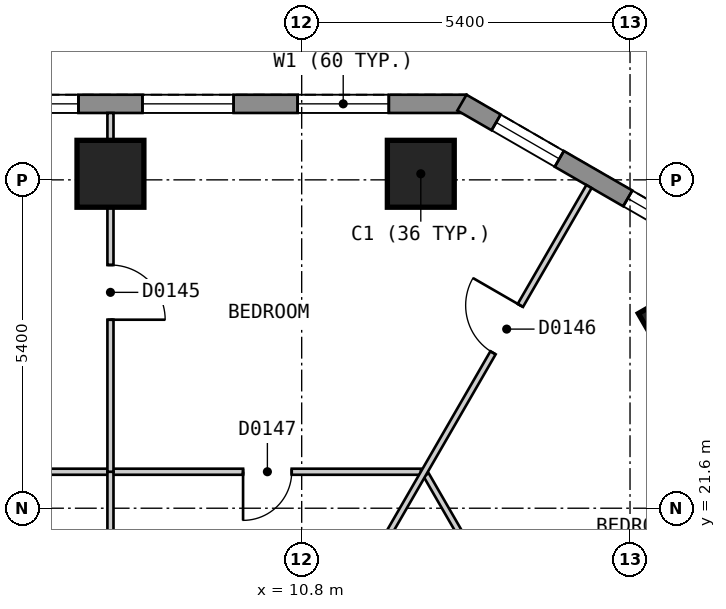
"""IFC4 building model, lengths in metres.
Left out: names, types, materials, properties, quantities, classifications, styles, units other than length and angle.
Written with IfcOpenShell. Run it as: python <this file> out.ifc"""

import sys

from ifc_helpers import new_model, si_unit, direction, frame, frame_2d, origin, origin_2d, place, context, subcontext, project, spatial, polyline, rectangle, outline, extrude, element, fill, save


model = new_model("IFC4")
c1 = context("Model", 3, precision=1e-05, world=origin(), true_north=direction((0.0, 1.0)))
c2 = subcontext(c1, "Body", "Model", "MODEL_VIEW")
j1 = project(units=[si_unit("LENGTHUNIT", "METRE"), si_unit("PLANEANGLEUNIT", "RADIAN")], contexts=[c1])
p1 = place(None, origin())
s1 = spatial("IfcSite", under=j1, at=p1, CompositionType="ELEMENT")
p2 = place(p1, origin())
s2 = spatial("IfcBuilding", under=s1, at=p2, CompositionType="ELEMENT")
p3 = place(p2, frame((0.0, 0.0, 23.4)))
s3 = spatial("IfcBuildingStorey", under=s2, at=p3, CompositionType="ELEMENT", Elevation=23.4)
for number, where, z_axis, x_axis in (
    (1, (12.759, 27.1, 0.0), (0.0, 0.0, 1.0), (-1.0, 0.0, 0.0)),
    (2, (7.655, 27.1, 0.0), (0.0, 0.0, 1.0), (-1.0, 0.0, 0.0)),
    (3, (17.089, 24.601, 0.0), (0.0, 0.0, 1.0), (-0.5, 0.866, 0.0)),
):
    element("IfcColumn", number, at=place(p3, frame(where, z_axis=z_axis, x_axis=x_axis)), inside=s3, PredefinedType="COLUMN", context=c2, shape_type="SweptSolid", body=[
        extrude(rectangle(XDim=1.1, YDim=1.1, at=origin_2d()), origin(), (0.0, 0.0, 1.0), 3.0),
    ])
p4 = place(p3, frame((13.51, 28.25, 0.0), z_axis=(0.0, 0.0, 1.0), x_axis=(-1.0, 0.0, 0.0)))
e4 = element("IfcWall", 4, at=p4, inside=s3, PredefinedType="SOLIDWALL", context=c2, shape_type="SweptSolid", body=[
    extrude(outline(polyline([(0.0, -0.15), (27.02, -0.15), (26.94, 0.15), (0.08, 0.15), (0.0, -0.15)])), origin(), (0.0, 0.0, 1.0), 2.7),
])
p5 = place(p4, frame((1.277, 0.0, 0.15)))
e5 = element("IfcOpeningElement", 5, at=p5, cuts=e4, PredefinedType="OPENING", context=c2, shape_type="SweptSolid", body=[
    extrude(rectangle(XDim=1.5, YDim=2.1, at=frame_2d((0.75, 1.05))), frame((0.0, 0.16, 0.0), z_axis=(0.0, -1.0, 0.0), x_axis=(1.0, 0.0, 0.0)), (0.0, 0.0, 1.0), 0.32),
])
p6 = place(p4, frame((3.829, 0.0, 0.15)))
e6 = element("IfcOpeningElement", 6, at=p6, cuts=e4, PredefinedType="OPENING", context=c2, shape_type="SweptSolid", body=[
    extrude(rectangle(XDim=1.5, YDim=2.1, at=frame_2d((0.75, 1.05))), frame((0.0, 0.16, 0.0), z_axis=(0.0, -1.0, 0.0), x_axis=(1.0, 0.0, 0.0)), (0.0, 0.0, 1.0), 0.32),
])
p7 = place(p4, frame((6.381, 0.0, 0.15)))
e7 = element("IfcOpeningElement", 7, at=p7, cuts=e4, PredefinedType="OPENING", context=c2, shape_type="SweptSolid", body=[
    extrude(rectangle(XDim=1.5, YDim=2.1, at=frame_2d((0.75, 1.05))), frame((0.0, 0.16, 0.0), z_axis=(0.0, -1.0, 0.0), x_axis=(1.0, 0.0, 0.0)), (0.0, 0.0, 1.0), 0.32),
])
p8 = place(p4, frame((8.933, 0.0, 0.15)))
e8 = element("IfcOpeningElement", 8, at=p8, cuts=e4, PredefinedType="OPENING", context=c2, shape_type="SweptSolid", body=[
    extrude(rectangle(XDim=1.5, YDim=2.1, at=frame_2d((0.75, 1.05))), frame((0.0, 0.16, 0.0), z_axis=(0.0, -1.0, 0.0), x_axis=(1.0, 0.0, 0.0)), (0.0, 0.0, 1.0), 0.32),
])
p9 = place(p4, frame((11.485, 0.0, 0.15)))
e9 = element("IfcOpeningElement", 9, at=p9, cuts=e4, PredefinedType="OPENING", context=c2, shape_type="SweptSolid", body=[
    extrude(rectangle(XDim=1.5, YDim=2.1, at=frame_2d((0.75, 1.05))), frame((0.0, 0.16, 0.0), z_axis=(0.0, -1.0, 0.0), x_axis=(1.0, 0.0, 0.0)), (0.0, 0.0, 1.0), 0.32),
])
p10 = place(p4, frame((14.037, 0.0, 0.15)))
e10 = element("IfcOpeningElement", 10, at=p10, cuts=e4, PredefinedType="OPENING", context=c2, shape_type="SweptSolid", body=[
    extrude(rectangle(XDim=1.5, YDim=2.1, at=frame_2d((0.75, 1.05))), frame((0.0, 0.16, 0.0), z_axis=(0.0, -1.0, 0.0), x_axis=(1.0, 0.0, 0.0)), (0.0, 0.0, 1.0), 0.32),
])
p11 = place(p4, frame((16.589, 0.0, 0.15)))
e11 = element("IfcOpeningElement", 11, at=p11, cuts=e4, PredefinedType="OPENING", context=c2, shape_type="SweptSolid", body=[
    extrude(rectangle(XDim=1.5, YDim=2.1, at=frame_2d((0.75, 1.05))), frame((0.0, 0.16, 0.0), z_axis=(0.0, -1.0, 0.0), x_axis=(1.0, 0.0, 0.0)), (0.0, 0.0, 1.0), 0.32),
])
p12 = place(p4, frame((19.141, 0.0, 0.15)))
e12 = element("IfcOpeningElement", 12, at=p12, cuts=e4, PredefinedType="OPENING", context=c2, shape_type="SweptSolid", body=[
    extrude(rectangle(XDim=1.5, YDim=2.1, at=frame_2d((0.75, 1.05))), frame((0.0, 0.16, 0.0), z_axis=(0.0, -1.0, 0.0), x_axis=(1.0, 0.0, 0.0)), (0.0, 0.0, 1.0), 0.32),
])
p13 = place(p4, frame((21.693, 0.0, 0.15)))
e13 = element("IfcOpeningElement", 13, at=p13, cuts=e4, PredefinedType="OPENING", context=c2, shape_type="SweptSolid", body=[
    extrude(rectangle(XDim=1.5, YDim=2.1, at=frame_2d((0.75, 1.05))), frame((0.0, 0.16, 0.0), z_axis=(0.0, -1.0, 0.0), x_axis=(1.0, 0.0, 0.0)), (0.0, 0.0, 1.0), 0.32),
])
p14 = place(p4, frame((24.245, 0.0, 0.15)))
e14 = element("IfcOpeningElement", 14, at=p14, cuts=e4, PredefinedType="OPENING", context=c2, shape_type="SweptSolid", body=[
    extrude(rectangle(XDim=1.5, YDim=2.1, at=frame_2d((0.75, 1.05))), frame((0.0, 0.16, 0.0), z_axis=(0.0, -1.0, 0.0), x_axis=(1.0, 0.0, 0.0)), (0.0, 0.0, 1.0), 0.32),
])
p15 = place(p3, frame((17.765, 25.77, 0.0), z_axis=(0.0, 0.0, 1.0), x_axis=(-0.866010750942, 0.50002537861, 0.0)))
e15 = element("IfcWall", 15, at=p15, inside=s3, PredefinedType="SOLIDWALL", context=c2, shape_type="SweptSolid", body=[
    extrude(outline(polyline([(0.0, -0.15), (5.0, -0.15), (4.919, 0.15), (0.08, 0.15), (0.0, -0.15)])), origin(), (0.0, 0.0, 1.0), 2.7),
])
p16 = place(p15, frame((0.65, 0.0, 0.15)))
e16 = element("IfcOpeningElement", 16, at=p16, cuts=e15, PredefinedType="OPENING", context=c2, shape_type="SweptSolid", body=[
    extrude(rectangle(XDim=1.2, YDim=2.1, at=frame_2d((0.6, 1.05))), frame((0.0, 0.16, 0.0), z_axis=(0.0, -1.0, 0.0), x_axis=(1.0, 0.0, 0.0)), (0.0, 0.0, 1.0), 0.32),
])
p17 = place(p15, frame((3.15, 0.0, 0.15)))
e17 = element("IfcOpeningElement", 17, at=p17, cuts=e15, PredefinedType="OPENING", context=c2, shape_type="SweptSolid", body=[
    extrude(rectangle(XDim=1.2, YDim=2.1, at=frame_2d((0.6, 1.05))), frame((0.0, 0.16, 0.0), z_axis=(0.0, -1.0, 0.0), x_axis=(1.0, 0.0, 0.0)), (0.0, 0.0, 1.0), 0.32),
])
p18 = place(p3, frame((12.846, 22.15, 0.0), z_axis=(0.0, 0.0, 1.0), x_axis=(0.500002715276, -0.866023836113, 0.0)))
e18 = element("IfcWall", 18, at=p18, inside=s3, PredefinedType="PARTITIONING", context=c2, shape_type="SweptSolid", body=[
    extrude(rectangle(XDim=5.002, YDim=0.1, at=frame_2d((2.501, 0.0))), origin(), (0.0, 0.0, 1.0), 2.7),
])
p19 = place(p18, frame((2.122, 0.0, 0.0)))
e19 = element("IfcOpeningElement", 19, at=p19, cuts=e18, PredefinedType="OPENING", context=c2, shape_type="SweptSolid", body=[
    extrude(rectangle(XDim=0.8, YDim=2.1, at=frame_2d((0.4, 1.05))), frame((0.0, 0.06, 0.0), z_axis=(0.0, -1.0, 0.0), x_axis=(1.0, 0.0, 0.0)), (0.0, 0.0, 1.0), 0.12),
])
p20 = place(p3, frame((2.651, 22.2, 0.0), z_axis=(0.0, 0.0, 1.0), x_axis=(1.0, 0.0, 0.0)))
e20 = element("IfcWall", 20, at=p20, inside=s3, PredefinedType="PARTITIONING", context=c2, shape_type="SweptSolid", body=[
    extrude(rectangle(XDim=10.109, YDim=0.1, at=frame_2d((5.055, 0.0))), origin(), (0.0, 0.0, 1.0), 2.7),
])
p21 = place(p20, frame((2.002, 0.0, 0.0)))
e21 = element("IfcOpeningElement", 21, at=p21, cuts=e20, PredefinedType="OPENING", context=c2, shape_type="SweptSolid", body=[
    extrude(rectangle(XDim=0.9, YDim=2.1, at=frame_2d((0.45, 1.05))), frame((0.0, 0.06, 0.0), z_axis=(0.0, -1.0, 0.0), x_axis=(1.0, 0.0, 0.0)), (0.0, 0.0, 1.0), 0.12),
])
p22 = place(p20, frame((7.185, 0.0, 0.0)))
e22 = element("IfcOpeningElement", 22, at=p22, cuts=e20, PredefinedType="OPENING", context=c2, shape_type="SweptSolid", body=[
    extrude(rectangle(XDim=0.8, YDim=2.1, at=frame_2d((0.4, 1.05))), frame((0.0, 0.06, 0.0), z_axis=(0.0, -1.0, 0.0), x_axis=(1.0, 0.0, 0.0)), (0.0, 0.0, 1.0), 0.12),
])
p23 = place(p3, frame((10.393, 18.0, 0.0), z_axis=(0.0, 0.0, 1.0), x_axis=(0.499945497007, 0.866056868816, 0.0)))
e23 = element("IfcWall", 23, at=p23, inside=s3, PredefinedType="PARTITIONING", context=c2, shape_type="SweptSolid", body=[
    extrude(rectangle(XDim=10.265, YDim=0.1, at=frame_2d((5.132, 0.0))), origin(), (0.0, 0.0, 1.0), 2.7),
])
p24 = place(p23, frame((7.108, 0.0, 0.0)))
e24 = element("IfcOpeningElement", 24, at=p24, cuts=e23, PredefinedType="OPENING", context=c2, shape_type="SweptSolid", body=[
    extrude(rectangle(XDim=0.9, YDim=2.1, at=frame_2d((0.45, 1.05))), frame((0.0, 0.06, 0.0), z_axis=(0.0, -1.0, 0.0), x_axis=(1.0, 0.0, 0.0)), (0.0, 0.0, 1.0), 0.12),
])
p25 = place(p3, frame((7.655, 18.1, 0.0), z_axis=(0.0, 0.0, 1.0), x_axis=(0.0, 1.0, 0.0)))
e25 = element("IfcWall", 25, at=p25, inside=s3, PredefinedType="PARTITIONING", context=c2, shape_type="SweptSolid", body=[
    extrude(rectangle(XDim=4.1, YDim=0.1, at=frame_2d((2.05, 0.0))), origin(), (0.0, 0.0, 1.0), 2.7),
])
p26 = place(p3, frame((7.655, 22.2, 0.0), z_axis=(0.0, 0.0, 1.0), x_axis=(0.0, 1.0, 0.0)))
e26 = element("IfcWall", 26, at=p26, inside=s3, PredefinedType="PARTITIONING", context=c2, shape_type="SweptSolid", body=[
    extrude(rectangle(XDim=5.9, YDim=0.1, at=frame_2d((2.95, 0.0))), origin(), (0.0, 0.0, 1.0), 2.7),
])
p27 = place(p26, frame((2.5, 0.0, 0.0)))
e27 = element("IfcOpeningElement", 27, at=p27, cuts=e26, PredefinedType="OPENING", context=c2, shape_type="SweptSolid", body=[
    extrude(rectangle(XDim=0.9, YDim=2.1, at=frame_2d((0.45, 1.05))), frame((0.0, 0.06, 0.0), z_axis=(0.0, -1.0, 0.0), x_axis=(1.0, 0.0, 0.0)), (0.0, 0.0, 1.0), 0.12),
])
p28 = place(p5, origin())
e28 = element("IfcWindow", 28, at=p28, inside=s3, PartitioningType="SINGLE_PANEL", PredefinedType="WINDOW", context=c2, shape_type="SweptSolid", body=[
    extrude(rectangle(XDim=1.5, YDim=2.1, at=frame_2d((0.75, 1.05))), frame((0.0, 0.03, 0.0), z_axis=(0.0, -1.0, 0.0), x_axis=(1.0, 0.0, 0.0)), (0.0, 0.0, 1.0), 0.06),
])
fill(e5, e28)
p29 = place(p6, origin())
e29 = element("IfcWindow", 29, at=p29, inside=s3, PartitioningType="SINGLE_PANEL", PredefinedType="WINDOW", context=c2, shape_type="SweptSolid", body=[
    extrude(rectangle(XDim=1.5, YDim=2.1, at=frame_2d((0.75, 1.05))), frame((0.0, 0.03, 0.0), z_axis=(0.0, -1.0, 0.0), x_axis=(1.0, 0.0, 0.0)), (0.0, 0.0, 1.0), 0.06),
])
fill(e6, e29)
p30 = place(p7, origin())
e30 = element("IfcWindow", 30, at=p30, inside=s3, PartitioningType="SINGLE_PANEL", PredefinedType="WINDOW", context=c2, shape_type="SweptSolid", body=[
    extrude(rectangle(XDim=1.5, YDim=2.1, at=frame_2d((0.75, 1.05))), frame((0.0, 0.03, 0.0), z_axis=(0.0, -1.0, 0.0), x_axis=(1.0, 0.0, 0.0)), (0.0, 0.0, 1.0), 0.06),
])
fill(e7, e30)
p31 = place(p16, origin())
e31 = element("IfcWindow", 31, at=p31, inside=s3, PartitioningType="SINGLE_PANEL", PredefinedType="WINDOW", context=c2, shape_type="SweptSolid", body=[
    extrude(rectangle(XDim=1.2, YDim=2.1, at=frame_2d((0.6, 1.05))), frame((0.0, 0.03, 0.0), z_axis=(0.0, -1.0, 0.0), x_axis=(1.0, 0.0, 0.0)), (0.0, 0.0, 1.0), 0.06),
])
fill(e16, e31)
p32 = place(p17, origin())
e32 = element("IfcWindow", 32, at=p32, inside=s3, PartitioningType="SINGLE_PANEL", PredefinedType="WINDOW", context=c2, shape_type="SweptSolid", body=[
    extrude(rectangle(XDim=1.2, YDim=2.1, at=frame_2d((0.6, 1.05))), frame((0.0, 0.03, 0.0), z_axis=(0.0, -1.0, 0.0), x_axis=(1.0, 0.0, 0.0)), (0.0, 0.0, 1.0), 0.06),
])
fill(e17, e32)
p33 = place(p27, origin())
e33 = element("IfcDoor", 33, at=p33, inside=s3, OperationType="SINGLE_SWING_LEFT", PredefinedType="DOOR", context=c2, shape_type="SweptSolid", body=[
    extrude(rectangle(XDim=0.9, YDim=2.1, at=frame_2d((0.45, 1.05))), frame((0.0, 0.025, 0.0), z_axis=(0.0, -1.0, 0.0), x_axis=(1.0, 0.0, 0.0)), (0.0, 0.0, 1.0), 0.05),
])
fill(e27, e33)
p34 = place(p24, origin())
e34 = element("IfcDoor", 34, at=p34, inside=s3, OperationType="SINGLE_SWING_RIGHT", PredefinedType="DOOR", context=c2, shape_type="SweptSolid", body=[
    extrude(rectangle(XDim=0.9, YDim=2.1, at=frame_2d((0.45, 1.05))), frame((0.0, 0.025, 0.0), z_axis=(0.0, -1.0, 0.0), x_axis=(1.0, 0.0, 0.0)), (0.0, 0.0, 1.0), 0.05),
])
fill(e24, e34)
p35 = place(p22, origin())
e35 = element("IfcDoor", 35, at=p35, inside=s3, OperationType="SINGLE_SWING_LEFT", PredefinedType="DOOR", context=c2, shape_type="SweptSolid", body=[
    extrude(rectangle(XDim=0.8, YDim=2.1, at=frame_2d((0.4, 1.05))), frame((0.0, 0.025, 0.0), z_axis=(0.0, -1.0, 0.0), x_axis=(1.0, 0.0, 0.0)), (0.0, 0.0, 1.0), 0.05),
])
fill(e22, e35)
save(model, sys.argv[1])
